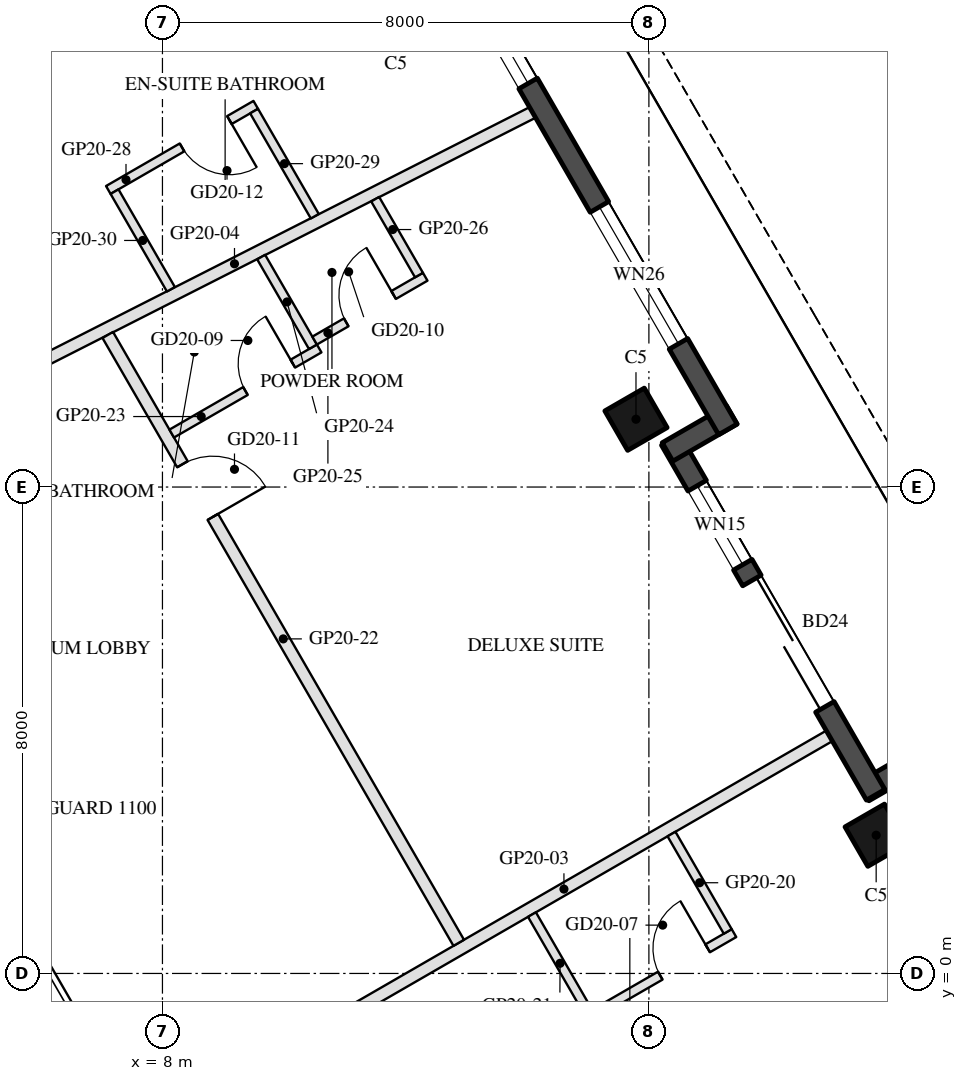
"""IFC4 building model, lengths in metres.
Left out: names, types, materials, properties, quantities, classifications, styles, units other than length and angle.
Written with IfcOpenShell. Run it as: python <this file> out.ifc"""

import sys

from ifc_helpers import new_model, si_unit, direction, frame, frame_2d, origin, origin_2d, place, context, subcontext, project, spatial, rectangle, hollow_rectangle, extrude, element, fill, save


model = new_model("IFC4")
c1 = context("Model", 3, precision=1e-05, world=origin(), true_north=direction((0.0, 1.0)))
c2 = subcontext(c1, "Body", "Model", "MODEL_VIEW")
j1 = project(units=[si_unit("LENGTHUNIT", "METRE"), si_unit("PLANEANGLEUNIT", "RADIAN")], contexts=[c1])
p1 = place(None, origin())
s1 = spatial("IfcSite", under=j1, at=p1, CompositionType="ELEMENT")
p2 = place(p1, origin())
s2 = spatial("IfcBuilding", under=s1, at=p2, CompositionType="ELEMENT")
p3 = place(p2, frame((0.0, 0.0, 209.5)))
s3 = spatial("IfcBuildingStorey", under=s2, at=p3, CompositionType="ELEMENT", Elevation=209.5)
for number, where, z_axis, x_axis in (
    (1, (19.738, 2.273, 0.0), (0.0, 0.0, 1.0), (-0.5, 0.866, 0.0)),
    (2, (15.788, 9.115, 0.0), (0.0, 0.0, 1.0), (-0.5, 0.866, 0.0)),
):
    element("IfcColumn", number, at=place(p3, frame(where, z_axis=z_axis, x_axis=x_axis)), inside=s3, PredefinedType="COLUMN", context=c2, shape_type="SweptSolid", body=[
        extrude(hollow_rectangle(XDim=0.75, YDim=0.75, WallThickness=0.035, at=origin_2d()), origin(), (0.0, 0.0, 1.0), 3.7),
    ])
p4 = place(p3, frame((20.588, 3.601, 0.0), z_axis=(0.0, 0.0, 1.0), x_axis=(-0.866005645448, -0.500034220881, 0.0)))
e3 = element("IfcWall", 3, at=p4, inside=s3, PredefinedType="SOLIDWALL", context=c2, shape_type="SweptSolid", body=[
    extrude(rectangle(XDim=1.22, YDim=0.35, at=frame_2d((0.61, 0.0))), origin(), (0.0, 0.0, 1.0), 3.55),
])
p5 = place(p3, frame((19.729, 2.938, 0.0), z_axis=(0.0, 0.0, 1.0), x_axis=(-0.499976430342, 0.866039011305, 0.0)))
e4 = element("IfcWall", 4, at=p5, inside=s3, PredefinedType="SOLIDWALL", context=c2, shape_type="SweptSolid", body=[
    extrude(rectangle(XDim=6.74, YDim=0.35, at=frame_2d((3.37, 0.0))), origin(), (0.0, 0.0, 1.0), 3.55),
])
p6 = place(p5, frame((1.67, 0.0, 0.0)))
e5 = element("IfcOpeningElement", 5, at=p6, cuts=e4, PredefinedType="OPENING", context=c2, shape_type="SweptSolid", body=[
    extrude(rectangle(XDim=2.4, YDim=2.4, at=frame_2d((1.2, 1.2))), frame((0.0, 0.185, 0.0), z_axis=(0.0, -1.0, 0.0), x_axis=(1.0, 0.0, 0.0)), (0.0, 0.0, 1.0), 0.37),
])
p7 = place(p5, frame((4.37, 0.0, 0.3)))
e6 = element("IfcOpeningElement", 6, at=p7, cuts=e4, PredefinedType="OPENING", context=c2, shape_type="SweptSolid", body=[
    extrude(rectangle(XDim=1.5, YDim=2.65, at=frame_2d((0.75, 1.325))), frame((0.0, 0.185, 0.0), z_axis=(0.0, -1.0, 0.0), x_axis=(1.0, 0.0, 0.0)), (0.0, 0.0, 1.0), 0.37),
])
p8 = place(p3, frame((16.306, 8.577, 0.0), z_axis=(0.0, 0.0, 1.0), x_axis=(0.866092288191, 0.499884134912, 0.0)))
e7 = element("IfcWall", 7, at=p8, inside=s3, PredefinedType="SOLIDWALL", context=c2, shape_type="SweptSolid", body=[
    extrude(rectangle(XDim=1.22, YDim=0.35, at=frame_2d((0.61, 0.0))), origin(), (0.0, 0.0, 1.0), 3.55),
])
p9 = place(p3, frame((17.299, 8.948, 0.0), z_axis=(0.0, 0.0, 1.0), x_axis=(-0.500010041276, 0.866019606374, 0.0)))
e8 = element("IfcWall", 8, at=p9, inside=s3, PredefinedType="SOLIDWALL", context=c2, shape_type="SweptSolid", body=[
    extrude(rectangle(XDim=9.7, YDim=0.35, at=frame_2d((4.85, 0.0))), origin(), (0.0, 0.0, 1.0), 3.55),
])
p10 = place(p9, frame((1.625, 0.0, 0.3)))
e9 = element("IfcOpeningElement", 9, at=p10, cuts=e8, PredefinedType="OPENING", context=c2, shape_type="SweptSolid", body=[
    extrude(rectangle(XDim=2.6, YDim=2.65, at=frame_2d((1.3, 1.325))), frame((0.0, 0.185, 0.0), z_axis=(0.0, -1.0, 0.0), x_axis=(1.0, 0.0, 0.0)), (0.0, 0.0, 1.0), 0.37),
])
p11 = place(p9, frame((6.57, 0.0, 0.3)))
e10 = element("IfcOpeningElement", 10, at=p11, cuts=e8, PredefinedType="OPENING", context=c2, shape_type="SweptSolid", body=[
    extrude(rectangle(XDim=1.5, YDim=2.65, at=frame_2d((0.75, 1.325))), frame((0.0, 0.185, 0.0), z_axis=(0.0, -1.0, 0.0), x_axis=(1.0, 0.0, 0.0)), (0.0, 0.0, 1.0), 0.37),
])
p12 = place(p3, frame((18.968, 3.907, 0.0), z_axis=(0.0, 0.0, 1.0), x_axis=(-0.866022637375, -0.500004791531, 0.0)))
e11 = element("IfcWall", 11, at=p12, inside=s3, PredefinedType="PARTITIONING", context=c2, shape_type="SweptSolid", body=[
    extrude(rectangle(XDim=10.08, YDim=0.2, at=frame_2d((5.04, 0.0))), origin(), (0.0, 0.0, 1.0), 3.06),
])
p13 = place(p3, frame((14.087, 14.161, 0.0), z_axis=(0.0, 0.0, 1.0), x_axis=(-0.891639053189, -0.452746947895, 0.0)))
e12 = element("IfcWall", 12, at=p13, inside=s3, PredefinedType="PARTITIONING", context=c2, shape_type="SweptSolid", body=[
    extrude(rectangle(XDim=10.996, YDim=0.2, at=frame_2d((5.498, 0.0))), origin(), (0.0, 0.0, 1.0), 3.06),
])
p14 = place(p3, frame((14.974, -0.737, 0.0), z_axis=(0.0, 0.0, 1.0), x_axis=(0.866018616679, 0.500011755427, 0.0)))
e13 = element("IfcWall", 13, at=p14, inside=s3, PredefinedType="PARTITIONING", context=c2, shape_type="SweptSolid", body=[
    extrude(rectangle(XDim=2.8, YDim=0.15, at=frame_2d((1.4, 0.0))), origin(), (0.0, 0.0, 1.0), 3.55),
])
p15 = place(p14, frame((1.4, 0.0, 0.0)))
e14 = element("IfcOpeningElement", 14, at=p15, cuts=e13, PredefinedType="OPENING", context=c2, shape_type="SweptSolid", body=[
    extrude(rectangle(XDim=0.9, YDim=2.1, at=frame_2d((0.45, 1.05))), frame((0.0, 0.085, 0.0), z_axis=(0.0, -1.0, 0.0), x_axis=(1.0, 0.0, 0.0)), (0.0, 0.0, 1.0), 0.17),
])
p16 = place(p3, frame((17.297, 0.691, 0.0), z_axis=(0.0, 0.0, 1.0), x_axis=(-0.499985172903, 0.866033964044, 0.0)))
e15 = element("IfcWall", 15, at=p16, inside=s3, PredefinedType="PARTITIONING", context=c2, shape_type="SweptSolid", body=[
    extrude(rectangle(XDim=1.85, YDim=0.15, at=frame_2d((0.925, 0.0))), origin(), (0.0, 0.0, 1.0), 2.95),
])
p17 = place(p3, frame((15.002, -0.634, 0.0), z_axis=(0.0, 0.0, 1.0), x_axis=(-0.500042316284, 0.866000971088, 0.0)))
e16 = element("IfcWall", 16, at=p17, inside=s3, PredefinedType="PARTITIONING", context=c2, shape_type="SweptSolid", body=[
    extrude(rectangle(XDim=1.85, YDim=0.15, at=frame_2d((0.925, 0.0))), origin(), (0.0, 0.0, 1.0), 2.95),
])
p18 = place(p3, frame((7.101, 10.501, 0.0), z_axis=(0.0, 0.0, 1.0), x_axis=(0.500001329633, -0.866024636119, 0.0)))
e17 = element("IfcWall", 17, at=p18, inside=s3, PredefinedType="PARTITIONING", context=c2, shape_type="SweptSolid", body=[
    extrude(rectangle(XDim=11.544, YDim=0.2, at=frame_2d((5.772, 0.0))), origin(), (0.0, 0.0, 1.0), 2.95),
])
p19 = place(p18, frame((2.455, 0.0, 0.0)))
e18 = element("IfcOpeningElement", 18, at=p19, cuts=e17, PredefinedType="OPENING", context=c2, shape_type="SweptSolid", body=[
    extrude(rectangle(XDim=1.0, YDim=2.1, at=frame_2d((0.5, 1.05))), frame((0.0, 0.11, 0.0), z_axis=(0.0, -1.0, 0.0), x_axis=(1.0, 0.0, 0.0)), (0.0, 0.0, 1.0), 0.22),
])
p20 = place(p3, frame((8.153, 8.879, 0.0), z_axis=(0.0, 0.0, 1.0), x_axis=(0.866034573852, 0.49998411664, 0.0)))
e19 = element("IfcWall", 19, at=p20, inside=s3, PredefinedType="PARTITIONING", context=c2, shape_type="SweptSolid", body=[
    extrude(rectangle(XDim=2.8, YDim=0.15, at=frame_2d((1.4, 0.0))), origin(), (0.0, 0.0, 1.0), 3.55),
])
p21 = place(p20, frame((1.4, 0.0, 0.0)))
e20 = element("IfcOpeningElement", 20, at=p21, cuts=e19, PredefinedType="OPENING", context=c2, shape_type="SweptSolid", body=[
    extrude(rectangle(XDim=0.9, YDim=2.1, at=frame_2d((0.45, 1.05))), frame((0.0, 0.085, 0.0), z_axis=(0.0, -1.0, 0.0), x_axis=(1.0, 0.0, 0.0)), (0.0, 0.0, 1.0), 0.17),
])
p22 = place(p3, frame((10.475, 10.307, 0.0), z_axis=(0.0, 0.0, 1.0), x_axis=(-0.500069835465, 0.865985080505, 0.0)))
e21 = element("IfcWall", 21, at=p22, inside=s3, PredefinedType="PARTITIONING", context=c2, shape_type="SweptSolid", body=[
    extrude(rectangle(XDim=1.703, YDim=0.15, at=frame_2d((0.852, 0.0))), origin(), (0.0, 0.0, 1.0), 2.95),
])
p23 = place(p3, frame((10.503, 10.409, 0.0), z_axis=(0.0, 0.0, 1.0), x_axis=(0.866009402589, 0.500027713859, 0.0)))
e22 = element("IfcWall", 22, at=p23, inside=s3, PredefinedType="PARTITIONING", context=c2, shape_type="SweptSolid", body=[
    extrude(rectangle(XDim=2.1, YDim=0.15, at=frame_2d((1.05, 0.0))), origin(), (0.0, 0.0, 1.0), 3.55),
])
p24 = place(p23, frame((0.6, 0.0, 0.0)))
e23 = element("IfcOpeningElement", 23, at=p24, cuts=e22, PredefinedType="OPENING", context=c2, shape_type="SweptSolid", body=[
    extrude(rectangle(XDim=0.9, YDim=2.1, at=frame_2d((0.45, 1.05))), frame((0.0, 0.085, 0.0), z_axis=(0.0, -1.0, 0.0), x_axis=(1.0, 0.0, 0.0)), (0.0, 0.0, 1.0), 0.17),
])
p25 = place(p3, frame((12.219, 11.486, 0.0), z_axis=(0.0, 0.0, 1.0), x_axis=(-0.500074377092, 0.865982457891, 0.0)))
e24 = element("IfcWall", 24, at=p25, inside=s3, PredefinedType="PARTITIONING", context=c2, shape_type="SweptSolid", body=[
    extrude(rectangle(XDim=1.441, YDim=0.15, at=frame_2d((0.721, 0.0))), origin(), (0.0, 0.0, 1.0), 2.95),
])
p26 = place(p3, frame((9.534, 14.286, 0.0), z_axis=(0.0, 0.0, 1.0), x_axis=(-0.866034573852, -0.49998411664, 0.0)))
e25 = element("IfcWall", 25, at=p26, inside=s3, PredefinedType="PARTITIONING", context=c2, shape_type="SweptSolid", body=[
    extrude(rectangle(XDim=2.8, YDim=0.15, at=frame_2d((1.4, 0.0))), origin(), (0.0, 0.0, 1.0), 3.55),
])
p27 = place(p26, frame((0.5, 0.0, 0.0)))
e26 = element("IfcOpeningElement", 26, at=p27, cuts=e25, PredefinedType="OPENING", context=c2, shape_type="SweptSolid", body=[
    extrude(rectangle(XDim=0.9, YDim=2.1, at=frame_2d((0.45, 1.05))), frame((0.0, 0.085, 0.0), z_axis=(0.0, -1.0, 0.0), x_axis=(1.0, 0.0, 0.0)), (0.0, 0.0, 1.0), 0.17),
])
p28 = place(p3, frame((10.505, 12.454, 0.0), z_axis=(0.0, 0.0, 1.0), x_axis=(-0.499965889992, 0.866045096311, 0.0)))
e27 = element("IfcWall", 27, at=p28, inside=s3, PredefinedType="PARTITIONING", context=c2, shape_type="SweptSolid", body=[
    extrude(rectangle(XDim=1.997, YDim=0.15, at=frame_2d((0.999, 0.0))), origin(), (0.0, 0.0, 1.0), 3.55),
])
p29 = place(p3, frame((8.139, 11.253, 0.0), z_axis=(0.0, 0.0, 1.0), x_axis=(-0.4999770169, 0.866038672677, 0.0)))
e28 = element("IfcWall", 28, at=p29, inside=s3, PredefinedType="PARTITIONING", context=c2, shape_type="SweptSolid", body=[
    extrude(rectangle(XDim=1.854, YDim=0.15, at=frame_2d((0.927, 0.0))), origin(), (0.0, 0.0, 1.0), 3.55),
])
p30 = place(p6, frame((2.4, 0.0, 0.0), z_axis=(0.0, 0.0, 1.0), x_axis=(-1.0, 0.0, 0.0)))
e29 = element("IfcDoor", 29, at=p30, inside=s3, OperationType="SLIDING_TO_LEFT", PredefinedType="DOOR", context=c2, shape_type="SweptSolid", body=[
    extrude(rectangle(XDim=2.4, YDim=2.4, at=frame_2d((1.2, 1.2))), frame((0.0, 0.025, 0.0), z_axis=(0.0, -1.0, 0.0), x_axis=(1.0, 0.0, 0.0)), (0.0, 0.0, 1.0), 0.05),
])
fill(e5, e29)
p31 = place(p7, origin())
e30 = element("IfcWindow", 30, at=p31, inside=s3, PartitioningType="SINGLE_PANEL", PredefinedType="WINDOW", context=c2, shape_type="SweptSolid", body=[
    extrude(rectangle(XDim=1.5, YDim=2.65, at=frame_2d((0.75, 1.325))), frame((0.0, 0.03, 0.0), z_axis=(0.0, -1.0, 0.0), x_axis=(1.0, 0.0, 0.0)), (0.0, 0.0, 1.0), 0.06),
])
fill(e6, e30)
p32 = place(p10, origin())
e31 = element("IfcWindow", 31, at=p32, inside=s3, PartitioningType="SINGLE_PANEL", PredefinedType="WINDOW", context=c2, shape_type="SweptSolid", body=[
    extrude(rectangle(XDim=2.6, YDim=2.65, at=frame_2d((1.3, 1.325))), frame((0.0, 0.03, 0.0), z_axis=(0.0, -1.0, 0.0), x_axis=(1.0, 0.0, 0.0)), (0.0, 0.0, 1.0), 0.06),
])
fill(e9, e31)
p33 = place(p11, origin())
e32 = element("IfcWindow", 32, at=p33, inside=s3, PartitioningType="SINGLE_PANEL", PredefinedType="WINDOW", context=c2, shape_type="SweptSolid", body=[
    extrude(rectangle(XDim=1.5, YDim=2.65, at=frame_2d((0.75, 1.325))), frame((0.0, 0.03, 0.0), z_axis=(0.0, -1.0, 0.0), x_axis=(1.0, 0.0, 0.0)), (0.0, 0.0, 1.0), 0.06),
])
fill(e10, e32)
p34 = place(p15, origin())
e33 = element("IfcDoor", 33, at=p34, inside=s3, OperationType="SINGLE_SWING_RIGHT", PredefinedType="DOOR", context=c2, shape_type="SweptSolid", body=[
    extrude(rectangle(XDim=0.9, YDim=2.1, at=frame_2d((0.45, 1.05))), frame((0.0, 0.025, 0.0), z_axis=(0.0, -1.0, 0.0), x_axis=(1.0, 0.0, 0.0)), (0.0, 0.0, 1.0), 0.05),
])
fill(e14, e33)
p35 = place(p21, origin())
e34 = element("IfcDoor", 34, at=p35, inside=s3, OperationType="SINGLE_SWING_RIGHT", PredefinedType="DOOR", context=c2, shape_type="SweptSolid", body=[
    extrude(rectangle(XDim=0.9, YDim=2.1, at=frame_2d((0.45, 1.05))), frame((0.0, 0.025, 0.0), z_axis=(0.0, -1.0, 0.0), x_axis=(1.0, 0.0, 0.0)), (0.0, 0.0, 1.0), 0.05),
])
fill(e20, e34)
p36 = place(p24, origin())
e35 = element("IfcDoor", 35, at=p36, inside=s3, OperationType="SINGLE_SWING_RIGHT", PredefinedType="DOOR", context=c2, shape_type="SweptSolid", body=[
    extrude(rectangle(XDim=0.9, YDim=2.1, at=frame_2d((0.45, 1.05))), frame((0.0, 0.025, 0.0), z_axis=(0.0, -1.0, 0.0), x_axis=(1.0, 0.0, 0.0)), (0.0, 0.0, 1.0), 0.05),
])
fill(e23, e35)
p37 = place(p19, origin())
e36 = element("IfcDoor", 36, at=p37, inside=s3, OperationType="SINGLE_SWING_RIGHT", PredefinedType="DOOR", context=c2, shape_type="SweptSolid", body=[
    extrude(rectangle(XDim=1.0, YDim=2.1, at=frame_2d((0.5, 1.05))), frame((0.0, 0.025, 0.0), z_axis=(0.0, -1.0, 0.0), x_axis=(1.0, 0.0, 0.0)), (0.0, 0.0, 1.0), 0.05),
])
fill(e18, e36)
p38 = place(p27, origin())
e37 = element("IfcDoor", 37, at=p38, inside=s3, OperationType="SINGLE_SWING_LEFT", PredefinedType="DOOR", context=c2, shape_type="SweptSolid", body=[
    extrude(rectangle(XDim=0.9, YDim=2.1, at=frame_2d((0.45, 1.05))), frame((0.0, 0.025, 0.0), z_axis=(0.0, -1.0, 0.0), x_axis=(1.0, 0.0, 0.0)), (0.0, 0.0, 1.0), 0.05),
])
fill(e26, e37)
save(model, sys.argv[1])
